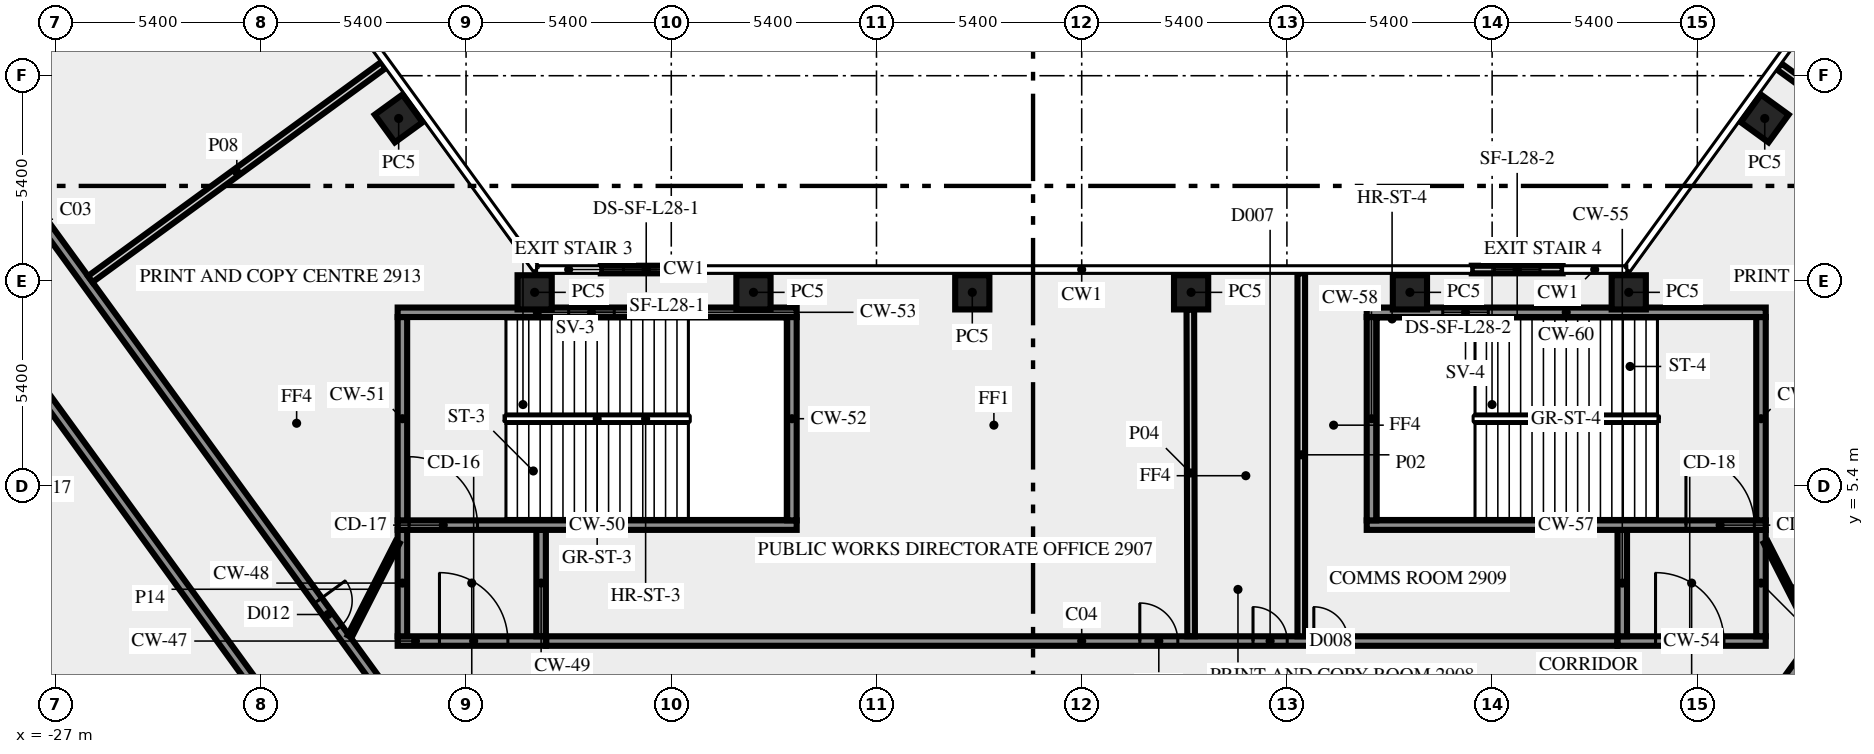
"""IFC4 building model, lengths in metres.
Left out: names, types, materials, properties, quantities, classifications, styles, units other than length and angle.
Written with IfcOpenShell. Run it as: python <this file> out.ifc"""

import sys

from ifc_helpers import new_model, si_unit, direction, frame, frame_2d, origin, origin_2d, place, context, subcontext, project, spatial, rectangle, extrude, element, fill, save


model = new_model("IFC4")
c1 = context("Model", 3, precision=1e-05, world=origin(), true_north=direction((0.0, 1.0)))
c2 = subcontext(c1, "Body", "Model", "MODEL_VIEW")
j1 = project(units=[si_unit("LENGTHUNIT", "METRE"), si_unit("PLANEANGLEUNIT", "RADIAN")], contexts=[c1])
p1 = place(None, origin())
s1 = spatial("IfcSite", under=j1, at=p1, CompositionType="ELEMENT")
p2 = place(p1, origin())
s2 = spatial("IfcBuilding", under=s1, at=p2, CompositionType="ELEMENT")
p3 = place(p2, frame((0.0, 0.0, 125.0)))
s3 = spatial("IfcBuildingStorey", under=s2, at=p3, CompositionType="ELEMENT", Elevation=125.0)
for number, where, z_axis, x_axis in (
    (1, (-17.974, 15.075, 0.0), (0.0, 0.0, 1.0), (-0.588, 0.809, 0.0)),
    (2, (17.974, 15.075, 0.0), (0.0, 0.0, 1.0), (-0.588, -0.809, 0.0)),
    (3, (14.395, 10.5, 0.0), (0.0, 0.0, 1.0), (-1.0, 0.0, 0.0)),
    (4, (8.637, 10.5, 0.0), (0.0, 0.0, 1.0), (-1.0, 0.0, 0.0)),
    (5, (2.879, 10.5, 0.0), (0.0, 0.0, 1.0), (-1.0, 0.0, 0.0)),
    (6, (-2.879, 10.5, 0.0), (0.0, 0.0, 1.0), (-1.0, 0.0, 0.0)),
    (7, (-8.637, 10.5, 0.0), (0.0, 0.0, 1.0), (-1.0, 0.0, 0.0)),
    (8, (-14.395, 10.5, 0.0), (0.0, 0.0, 1.0), (-1.0, 0.0, 0.0)),
):
    element("IfcColumn", number, at=place(p3, frame(where, z_axis=z_axis, x_axis=x_axis)), inside=s3, PredefinedType="COLUMN", context=c2, shape_type="SweptSolid", body=[
        extrude(rectangle(XDim=0.9, YDim=0.9, at=origin_2d()), origin(), (0.0, 0.0, 1.0), 3.65),
    ])
p4 = place(p3, frame((12.655, 11.1, 0.0), z_axis=(0.0, 0.0, 1.0), x_axis=(-1.0, 0.0, 0.0)))
e9 = element("IfcWall", 9, at=p4, inside=s3, PredefinedType="SOLIDWALL", context=c2, shape_type="SweptSolid", body=[
    extrude(rectangle(XDim=2.392, YDim=0.2, at=frame_2d((1.196, 0.0))), origin(), (0.0, 0.0, 1.0), 3.65),
])
p5 = place(p4, frame((0.596, 0.0, 1.0)))
e10 = element("IfcOpeningElement", 10, at=p5, cuts=e9, PredefinedType="OPENING", context=c2, shape_type="SweptSolid", body=[
    extrude(rectangle(XDim=1.2, YDim=1.2, at=frame_2d((0.6, 0.6))), frame((0.0, 0.11, 0.0), z_axis=(0.0, -1.0, 0.0), x_axis=(1.0, 0.0, 0.0)), (0.0, 0.0, 1.0), 0.22),
])
p6 = place(p3, frame((-10.263, 11.1, 0.0), z_axis=(0.0, 0.0, 1.0), x_axis=(-1.0, 0.0, 0.0)))
e11 = element("IfcWall", 11, at=p6, inside=s3, PredefinedType="SOLIDWALL", context=c2, shape_type="SweptSolid", body=[
    extrude(rectangle(XDim=2.392, YDim=0.2, at=frame_2d((1.196, 0.0))), origin(), (0.0, 0.0, 1.0), 3.65),
])
p7 = place(p6, frame((0.596, 0.0, 1.0)))
e12 = element("IfcOpeningElement", 12, at=p7, cuts=e11, PredefinedType="OPENING", context=c2, shape_type="SweptSolid", body=[
    extrude(rectangle(XDim=1.2, YDim=1.2, at=frame_2d((0.6, 0.6))), frame((0.0, 0.11, 0.0), z_axis=(0.0, -1.0, 0.0), x_axis=(1.0, 0.0, 0.0)), (0.0, 0.0, 1.0), 0.22),
])
p8 = place(p3, frame((-18.0, 1.325, 0.0), z_axis=(0.0, 0.0, 1.0), x_axis=(1.0, 0.0, 0.0)))
e13 = element("IfcWall", 13, at=p8, inside=s3, PredefinedType="SHEAR", context=c2, shape_type="SweptSolid", body=[
    extrude(rectangle(XDim=3.9, YDim=0.25, at=frame_2d((1.95, 0.0))), origin(), (0.0, 0.0, 1.0), 3.65),
])
p9 = place(p8, frame((1.1, 0.0, 0.0)))
e14 = element("IfcOpeningElement", 14, at=p9, cuts=e13, PredefinedType="OPENING", context=c2, shape_type="SweptSolid", body=[
    extrude(rectangle(XDim=1.8, YDim=2.1, at=frame_2d((0.9, 1.05))), frame((0.0, 0.135, 0.0), z_axis=(0.0, -1.0, 0.0), x_axis=(1.0, 0.0, 0.0)), (0.0, 0.0, 1.0), 0.27),
])
for number, where, z_axis, x_axis in (
    (15, (-17.875, 1.45, 0.0), (0.0, 0.0, 1.0), (0.0, 1.0, 0.0)),
    (16, (-14.225, 1.45, 0.0), (0.0, 0.0, 1.0), (0.0, 1.0, 0.0)),
):
    element("IfcWall", number, at=place(p3, frame(where, z_axis=z_axis, x_axis=x_axis)), inside=s3, PredefinedType="SHEAR", context=c2, shape_type="SweptSolid", body=[
        extrude(rectangle(XDim=2.8, YDim=0.25, at=frame_2d((1.4, 0.0))), origin(), (0.0, 0.0, 1.0), 3.65),
    ])
p10 = place(p3, frame((-18.0, 4.375, 0.0), z_axis=(0.0, 0.0, 1.0), x_axis=(1.0, 0.0, 0.0)))
e17 = element("IfcWall", 17, at=p10, inside=s3, PredefinedType="SHEAR", context=c2, shape_type="SweptSolid", body=[
    extrude(rectangle(XDim=10.5, YDim=0.25, at=frame_2d((5.25, 0.0))), origin(), (0.0, 0.0, 1.0), 3.65),
])
p11 = place(p10, frame((0.3, 0.0, 0.0)))
e18 = element("IfcOpeningElement", 18, at=p11, cuts=e17, PredefinedType="OPENING", context=c2, shape_type="SweptSolid", body=[
    extrude(rectangle(XDim=1.8, YDim=2.1, at=frame_2d((0.9, 1.05))), frame((0.0, 0.135, 0.0), z_axis=(0.0, -1.0, 0.0), x_axis=(1.0, 0.0, 0.0)), (0.0, 0.0, 1.0), 0.27),
])
for number, where, z_axis, x_axis in (
    (19, (-17.875, 4.5, 0.0), (0.0, 0.0, 1.0), (0.0, 1.0, 0.0)),
    (20, (-7.625, 4.5, 0.0), (0.0, 0.0, 1.0), (0.0, 1.0, 0.0)),
):
    element("IfcWall", number, at=place(p3, frame(where, z_axis=z_axis, x_axis=x_axis)), inside=s3, PredefinedType="SHEAR", context=c2, shape_type="SweptSolid", body=[
        extrude(rectangle(XDim=5.35, YDim=0.25, at=frame_2d((2.675, 0.0))), origin(), (0.0, 0.0, 1.0), 3.65),
    ])
p12 = place(p3, frame((-18.0, 9.975, 0.0), z_axis=(0.0, 0.0, 1.0), x_axis=(1.0, 0.0, 0.0)))
e21 = element("IfcWall", 21, at=p12, inside=s3, PredefinedType="SHEAR", context=c2, shape_type="SweptSolid", body=[
    extrude(rectangle(XDim=10.5, YDim=0.25, at=frame_2d((5.25, 0.0))), origin(), (0.0, 0.0, 1.0), 3.65),
])
p13 = place(p12, frame((4.5, 0.0, 1.0)))
e22 = element("IfcOpeningElement", 22, at=p13, cuts=e21, PredefinedType="OPENING", context=c2, shape_type="SweptSolid", body=[
    extrude(rectangle(XDim=1.2, YDim=1.2, at=frame_2d((0.6, 0.6))), frame((0.0, 0.135, 0.0), z_axis=(0.0, -1.0, 0.0), x_axis=(1.0, 0.0, 0.0)), (0.0, 0.0, 1.0), 0.27),
])
p14 = place(p3, frame((14.1, 1.325, 0.0), z_axis=(0.0, 0.0, 1.0), x_axis=(1.0, 0.0, 0.0)))
e23 = element("IfcWall", 23, at=p14, inside=s3, PredefinedType="SHEAR", context=c2, shape_type="SweptSolid", body=[
    extrude(rectangle(XDim=3.9, YDim=0.25, at=frame_2d((1.95, 0.0))), origin(), (0.0, 0.0, 1.0), 3.65),
])
p15 = place(p14, frame((1.0, 0.0, 0.0)))
e24 = element("IfcOpeningElement", 24, at=p15, cuts=e23, PredefinedType="OPENING", context=c2, shape_type="SweptSolid", body=[
    extrude(rectangle(XDim=1.8, YDim=2.1, at=frame_2d((0.9, 1.05))), frame((0.0, 0.135, 0.0), z_axis=(0.0, -1.0, 0.0), x_axis=(1.0, 0.0, 0.0)), (0.0, 0.0, 1.0), 0.27),
])
for number, where, z_axis, x_axis in (
    (25, (14.225, 1.45, 0.0), (0.0, 0.0, 1.0), (0.0, 1.0, 0.0)),
    (26, (17.875, 1.45, 0.0), (0.0, 0.0, 1.0), (0.0, 1.0, 0.0)),
):
    element("IfcWall", number, at=place(p3, frame(where, z_axis=z_axis, x_axis=x_axis)), inside=s3, PredefinedType="SHEAR", context=c2, shape_type="SweptSolid", body=[
        extrude(rectangle(XDim=2.8, YDim=0.25, at=frame_2d((1.4, 0.0))), origin(), (0.0, 0.0, 1.0), 3.65),
    ])
p16 = place(p3, frame((7.5, 4.375, 0.0), z_axis=(0.0, 0.0, 1.0), x_axis=(1.0, 0.0, 0.0)))
e27 = element("IfcWall", 27, at=p16, inside=s3, PredefinedType="SHEAR", context=c2, shape_type="SweptSolid", body=[
    extrude(rectangle(XDim=10.5, YDim=0.25, at=frame_2d((5.25, 0.0))), origin(), (0.0, 0.0, 1.0), 3.65),
])
p17 = place(p16, frame((8.4, 0.0, 0.0)))
e28 = element("IfcOpeningElement", 28, at=p17, cuts=e27, PredefinedType="OPENING", context=c2, shape_type="SweptSolid", body=[
    extrude(rectangle(XDim=1.8, YDim=2.1, at=frame_2d((0.9, 1.05))), frame((0.0, 0.135, 0.0), z_axis=(0.0, -1.0, 0.0), x_axis=(1.0, 0.0, 0.0)), (0.0, 0.0, 1.0), 0.27),
])
for number, where, z_axis, x_axis in (
    (29, (7.625, 4.5, 0.0), (0.0, 0.0, 1.0), (0.0, 1.0, 0.0)),
    (30, (17.875, 4.5, 0.0), (0.0, 0.0, 1.0), (0.0, 1.0, 0.0)),
):
    element("IfcWall", number, at=place(p3, frame(where, z_axis=z_axis, x_axis=x_axis)), inside=s3, PredefinedType="SHEAR", context=c2, shape_type="SweptSolid", body=[
        extrude(rectangle(XDim=5.35, YDim=0.25, at=frame_2d((2.675, 0.0))), origin(), (0.0, 0.0, 1.0), 3.65),
    ])
p18 = place(p3, frame((7.5, 9.975, 0.0), z_axis=(0.0, 0.0, 1.0), x_axis=(1.0, 0.0, 0.0)))
e31 = element("IfcWall", 31, at=p18, inside=s3, PredefinedType="SHEAR", context=c2, shape_type="SweptSolid", body=[
    extrude(rectangle(XDim=10.5, YDim=0.25, at=frame_2d((5.25, 0.0))), origin(), (0.0, 0.0, 1.0), 3.65),
])
p19 = place(p18, frame((2.0, 0.0, 1.0)))
e32 = element("IfcOpeningElement", 32, at=p19, cuts=e31, PredefinedType="OPENING", context=c2, shape_type="SweptSolid", body=[
    extrude(rectangle(XDim=1.2, YDim=1.2, at=frame_2d((0.6, 0.6))), frame((0.0, 0.135, 0.0), z_axis=(0.0, -1.0, 0.0), x_axis=(1.0, 0.0, 0.0)), (0.0, 0.0, 1.0), 0.27),
])
p20 = place(p3, frame((-20.531, -1.523, 0.0), z_axis=(0.0, 0.0, 1.0), x_axis=(-0.587784522481, 0.809017524614, 0.0)))
e33 = element("IfcWall", 33, at=p20, inside=s3, PredefinedType="SOLIDWALL", context=c2, shape_type="SweptSolid", body=[
    extrude(rectangle(XDim=49.912, YDim=0.25, at=frame_2d((24.956, 0.0))), origin(), (0.0, 0.0, 1.0), 3.65),
])
p21 = place(p20, frame((34.816, 0.0, 0.0)))
e34 = element("IfcOpeningElement", 34, at=p21, cuts=e33, PredefinedType="OPENING", context=c2, shape_type="SweptSolid", body=[
    extrude(rectangle(XDim=0.9, YDim=2.1, at=frame_2d((0.45, 1.05))), frame((0.0, 0.135, 0.0), z_axis=(0.0, -1.0, 0.0), x_axis=(1.0, 0.0, 0.0)), (0.0, 0.0, 1.0), 0.27),
])
p22 = place(p20, frame((33.215, 0.0, 0.0)))
e35 = element("IfcOpeningElement", 35, at=p22, cuts=e33, PredefinedType="OPENING", context=c2, shape_type="SweptSolid", body=[
    extrude(rectangle(XDim=0.9, YDim=2.1, at=frame_2d((0.45, 1.05))), frame((0.0, 0.135, 0.0), z_axis=(0.0, -1.0, 0.0), x_axis=(1.0, 0.0, 0.0)), (0.0, 0.0, 1.0), 0.27),
])
p23 = place(p20, frame((22.916, 0.0, 0.0)))
e36 = element("IfcOpeningElement", 36, at=p23, cuts=e33, PredefinedType="OPENING", context=c2, shape_type="SweptSolid", body=[
    extrude(rectangle(XDim=1.8, YDim=2.1, at=frame_2d((0.9, 1.05))), frame((0.0, 0.135, 0.0), z_axis=(0.0, -1.0, 0.0), x_axis=(1.0, 0.0, 0.0)), (0.0, 0.0, 1.0), 0.27),
])
p24 = place(p20, frame((0.483, 0.0, 0.0)))
e37 = element("IfcOpeningElement", 37, at=p24, cuts=e33, PredefinedType="OPENING", context=c2, shape_type="SweptSolid", body=[
    extrude(rectangle(XDim=1.8, YDim=2.1, at=frame_2d((0.9, 1.05))), frame((0.0, 0.135, 0.0), z_axis=(0.0, -1.0, 0.0), x_axis=(1.0, 0.0, 0.0)), (0.0, 0.0, 1.0), 0.27),
])
p25 = place(p20, frame((25.365, 0.0, 0.0)))
e38 = element("IfcOpeningElement", 38, at=p25, cuts=e33, PredefinedType="OPENING", context=c2, shape_type="SweptSolid", body=[
    extrude(rectangle(XDim=0.9, YDim=2.1, at=frame_2d((0.45, 1.05))), frame((0.0, 0.135, 0.0), z_axis=(0.0, -1.0, 0.0), x_axis=(1.0, 0.0, 0.0)), (0.0, 0.0, 1.0), 0.27),
])
p26 = place(p3, frame((-37.232, 25.972, 0.0), z_axis=(0.0, 0.0, 1.0), x_axis=(0.587786323093, -0.809016216391, 0.0)))
e39 = element("IfcWall", 39, at=p26, inside=s3, PredefinedType="SOLIDWALL", context=c2, shape_type="SweptSolid", body=[
    extrude(rectangle(XDim=33.493, YDim=0.25, at=frame_2d((16.747, 0.0))), origin(), (0.0, 0.0, 1.0), 3.65),
])
p27 = place(p26, frame((9.785, 0.0, 0.0)))
e40 = element("IfcOpeningElement", 40, at=p27, cuts=e39, PredefinedType="OPENING", context=c2, shape_type="SweptSolid", body=[
    extrude(rectangle(XDim=1.8, YDim=2.1, at=frame_2d((0.9, 1.05))), frame((0.0, 0.135, 0.0), z_axis=(0.0, -1.0, 0.0), x_axis=(1.0, 0.0, 0.0)), (0.0, 0.0, 1.0), 0.27),
])
p28 = place(p26, frame((29.152, 0.0, 0.0)))
e41 = element("IfcOpeningElement", 41, at=p28, cuts=e39, PredefinedType="OPENING", context=c2, shape_type="SweptSolid", body=[
    extrude(rectangle(XDim=0.9, YDim=2.1, at=frame_2d((0.45, 1.05))), frame((0.0, 0.135, 0.0), z_axis=(0.0, -1.0, 0.0), x_axis=(1.0, 0.0, 0.0)), (0.0, 0.0, 1.0), 0.27),
])
p29 = place(p26, frame((1.335, 0.0, 0.0)))
e42 = element("IfcOpeningElement", 42, at=p29, cuts=e39, PredefinedType="OPENING", context=c2, shape_type="SweptSolid", body=[
    extrude(rectangle(XDim=0.9, YDim=2.1, at=frame_2d((0.45, 1.05))), frame((0.0, 0.135, 0.0), z_axis=(0.0, -1.0, 0.0), x_axis=(1.0, 0.0, 0.0)), (0.0, 0.0, 1.0), 0.27),
])
p30 = place(p3, frame((-14.09, 1.325, 0.0), z_axis=(0.0, 0.0, 1.0), x_axis=(1.0, 0.0, 0.0)))
e43 = element("IfcWall", 43, at=p30, inside=s3, PredefinedType="SOLIDWALL", context=c2, shape_type="SweptSolid", body=[
    extrude(rectangle(XDim=28.18, YDim=0.25, at=frame_2d((14.09, 0.0))), origin(), (0.0, 0.0, 1.0), 3.65),
])
p31 = place(p30, frame((20.198, 0.0, 0.0)))
e44 = element("IfcOpeningElement", 44, at=p31, cuts=e43, PredefinedType="OPENING", context=c2, shape_type="SweptSolid", body=[
    extrude(rectangle(XDim=0.9, YDim=2.1, at=frame_2d((0.45, 1.05))), frame((0.0, 0.135, 0.0), z_axis=(0.0, -1.0, 0.0), x_axis=(1.0, 0.0, 0.0)), (0.0, 0.0, 1.0), 0.27),
])
p32 = place(p30, frame((15.619, 0.0, 0.0)))
e45 = element("IfcOpeningElement", 45, at=p32, cuts=e43, PredefinedType="OPENING", context=c2, shape_type="SweptSolid", body=[
    extrude(rectangle(XDim=1.0, YDim=2.1, at=frame_2d((0.5, 1.05))), frame((0.0, 0.135, 0.0), z_axis=(0.0, -1.0, 0.0), x_axis=(1.0, 0.0, 0.0)), (0.0, 0.0, 1.0), 0.27),
])
p33 = place(p30, frame((18.598, 0.0, 0.0)))
e46 = element("IfcOpeningElement", 46, at=p33, cuts=e43, PredefinedType="OPENING", context=c2, shape_type="SweptSolid", body=[
    extrude(rectangle(XDim=0.9, YDim=2.1, at=frame_2d((0.45, 1.05))), frame((0.0, 0.135, 0.0), z_axis=(0.0, -1.0, 0.0), x_axis=(1.0, 0.0, 0.0)), (0.0, 0.0, 1.0), 0.27),
])
p34 = place(p3, frame((17.545, -1.125, 0.0), z_axis=(0.0, 0.0, 1.0), x_axis=(0.587786330937, 0.809016210693, 0.0)))
e47 = element("IfcWall", 47, at=p34, inside=s3, PredefinedType="SOLIDWALL", context=c2, shape_type="SweptSolid", body=[
    extrude(rectangle(XDim=30.103, YDim=0.25, at=frame_2d((15.052, 0.0))), origin(), (0.0, 0.0, 1.0), 3.65),
])
p35 = place(p34, frame((3.441, 0.0, 0.0)))
e48 = element("IfcOpeningElement", 48, at=p35, cuts=e47, PredefinedType="OPENING", context=c2, shape_type="SweptSolid", body=[
    extrude(rectangle(XDim=0.9, YDim=2.1, at=frame_2d((0.45, 1.05))), frame((0.0, 0.135, 0.0), z_axis=(0.0, -1.0, 0.0), x_axis=(1.0, 0.0, 0.0)), (0.0, 0.0, 1.0), 0.27),
])
p36 = place(p34, frame((28.729, 0.0, 0.0)))
e49 = element("IfcOpeningElement", 49, at=p36, cuts=e47, PredefinedType="OPENING", context=c2, shape_type="SweptSolid", body=[
    extrude(rectangle(XDim=0.9, YDim=2.1, at=frame_2d((0.45, 1.05))), frame((0.0, 0.135, 0.0), z_axis=(0.0, -1.0, 0.0), x_axis=(1.0, 0.0, 0.0)), (0.0, 0.0, 1.0), 0.27),
])
p37 = place(p3, frame((5.778, 11.0, 0.0), z_axis=(0.0, 0.0, 1.0), x_axis=(0.0, -1.0, 0.0)))
e50 = element("IfcWall", 50, at=p37, inside=s3, PredefinedType="SOLIDWALL", context=c2, shape_type="SweptSolid", body=[
    extrude(rectangle(XDim=9.55, YDim=0.2, at=frame_2d((4.775, 0.0))), origin(), (0.0, 0.0, 1.0), 2.75),
])
p38 = place(p3, frame((2.879, 1.45, 0.0), z_axis=(0.0, 0.0, 1.0), x_axis=(-0.002357613104, 0.999997220826, 0.0)))
e51 = element("IfcWall", 51, at=p38, inside=s3, PredefinedType="SOLIDWALL", context=c2, shape_type="SweptSolid", body=[
    extrude(rectangle(XDim=8.595, YDim=0.2, at=frame_2d((4.297, 0.0))), origin(), (0.0, 0.0, 1.0), 3.65),
])
p39 = place(p3, frame((-26.089, 10.848, 0.0), z_axis=(0.0, 0.0, 1.0), x_axis=(0.807661302092, 0.589646691759, 0.0)))
e52 = element("IfcWall", 52, at=p39, inside=s3, PredefinedType="SOLIDWALL", context=c2, shape_type="SweptSolid", body=[
    extrude(rectangle(XDim=9.55, YDim=0.2, at=frame_2d((4.775, 0.0))), origin(), (0.0, 0.0, 1.0), 2.75),
])
p40 = place(p3, frame((26.077, 10.832, 0.0), z_axis=(0.0, 0.0, 1.0), x_axis=(-0.809052142986, 0.587736871338, 0.0)))
e53 = element("IfcWall", 53, at=p40, inside=s3, PredefinedType="SOLIDWALL", context=c2, shape_type="SweptSolid", body=[
    extrude(rectangle(XDim=9.55, YDim=0.2, at=frame_2d((4.775, 0.0))), origin(), (0.0, 0.0, 1.0), 2.75),
])
for number, where, z_axis, x_axis in (
    (54, (18.0, 3.925, 0.0), (0.0, 0.0, 1.0), (0.454, -0.891, 0.0)),
    (55, (-19.261, 1.45, 0.0), (0.0, 0.0, 1.0), (0.454, 0.891, 0.0)),
):
    element("IfcWall", number, at=place(p3, frame(where, z_axis=z_axis, x_axis=x_axis)), inside=s3, PredefinedType="PARTITIONING", context=c2, shape_type="SweptSolid", body=[
        extrude(rectangle(XDim=2.778, YDim=0.12, at=frame_2d((1.389, 0.0))), origin(), (0.0, 0.0, 1.0), 3.65),
    ])
p41 = place(p5, origin())
e56 = element("IfcWindow", 56, at=p41, inside=s3, PartitioningType="SINGLE_PANEL", PredefinedType="WINDOW", context=c2, shape_type="SweptSolid", body=[
    extrude(rectangle(XDim=1.2, YDim=1.2, at=frame_2d((0.6, 0.6))), frame((0.0, 0.03, 0.0), z_axis=(0.0, -1.0, 0.0), x_axis=(1.0, 0.0, 0.0)), (0.0, 0.0, 1.0), 0.06),
])
fill(e10, e56)
p42 = place(p7, origin())
e57 = element("IfcWindow", 57, at=p42, inside=s3, PartitioningType="SINGLE_PANEL", PredefinedType="WINDOW", context=c2, shape_type="SweptSolid", body=[
    extrude(rectangle(XDim=1.2, YDim=1.2, at=frame_2d((0.6, 0.6))), frame((0.0, 0.03, 0.0), z_axis=(0.0, -1.0, 0.0), x_axis=(1.0, 0.0, 0.0)), (0.0, 0.0, 1.0), 0.06),
])
fill(e12, e57)
p43 = place(p9, origin())
e58 = element("IfcDoor", 58, at=p43, inside=s3, OperationType="DOUBLE_DOOR_SINGLE_SWING", PredefinedType="DOOR", context=c2, shape_type="SweptSolid", body=[
    extrude(rectangle(XDim=1.8, YDim=2.1, at=frame_2d((0.9, 1.05))), frame((0.0, 0.025, 0.0), z_axis=(0.0, -1.0, 0.0), x_axis=(1.0, 0.0, 0.0)), (0.0, 0.0, 1.0), 0.05),
])
fill(e14, e58)
p44 = place(p11, origin())
e59 = element("IfcDoor", 59, at=p44, inside=s3, OperationType="DOUBLE_DOOR_SINGLE_SWING", PredefinedType="DOOR", context=c2, shape_type="SweptSolid", body=[
    extrude(rectangle(XDim=1.8, YDim=2.1, at=frame_2d((0.9, 1.05))), frame((0.0, 0.025, 0.0), z_axis=(0.0, -1.0, 0.0), x_axis=(1.0, 0.0, 0.0)), (0.0, 0.0, 1.0), 0.05),
])
fill(e18, e59)
p45 = place(p13, origin())
e60 = element("IfcWindow", 60, at=p45, inside=s3, PartitioningType="SINGLE_PANEL", PredefinedType="WINDOW", context=c2, shape_type="SweptSolid", body=[
    extrude(rectangle(XDim=1.2, YDim=1.2, at=frame_2d((0.6, 0.6))), frame((0.0, 0.03, 0.0), z_axis=(0.0, -1.0, 0.0), x_axis=(1.0, 0.0, 0.0)), (0.0, 0.0, 1.0), 0.06),
])
fill(e22, e60)
p46 = place(p15, origin())
e61 = element("IfcDoor", 61, at=p46, inside=s3, OperationType="DOUBLE_DOOR_SINGLE_SWING", PredefinedType="DOOR", context=c2, shape_type="SweptSolid", body=[
    extrude(rectangle(XDim=1.8, YDim=2.1, at=frame_2d((0.9, 1.05))), frame((0.0, 0.025, 0.0), z_axis=(0.0, -1.0, 0.0), x_axis=(1.0, 0.0, 0.0)), (0.0, 0.0, 1.0), 0.05),
])
fill(e24, e61)
p47 = place(p17, origin())
e62 = element("IfcDoor", 62, at=p47, inside=s3, OperationType="DOUBLE_DOOR_SINGLE_SWING", PredefinedType="DOOR", context=c2, shape_type="SweptSolid", body=[
    extrude(rectangle(XDim=1.8, YDim=2.1, at=frame_2d((0.9, 1.05))), frame((0.0, 0.025, 0.0), z_axis=(0.0, -1.0, 0.0), x_axis=(1.0, 0.0, 0.0)), (0.0, 0.0, 1.0), 0.05),
])
fill(e28, e62)
p48 = place(p19, origin())
e63 = element("IfcWindow", 63, at=p48, inside=s3, PartitioningType="SINGLE_PANEL", PredefinedType="WINDOW", context=c2, shape_type="SweptSolid", body=[
    extrude(rectangle(XDim=1.2, YDim=1.2, at=frame_2d((0.6, 0.6))), frame((0.0, 0.03, 0.0), z_axis=(0.0, -1.0, 0.0), x_axis=(1.0, 0.0, 0.0)), (0.0, 0.0, 1.0), 0.06),
])
fill(e32, e63)
p49 = place(p31, origin())
e64 = element("IfcDoor", 64, at=p49, inside=s3, OperationType="SINGLE_SWING_LEFT", PredefinedType="DOOR", context=c2, shape_type="SweptSolid", body=[
    extrude(rectangle(XDim=0.9, YDim=2.1, at=frame_2d((0.45, 1.05))), frame((0.0, 0.025, 0.0), z_axis=(0.0, -1.0, 0.0), x_axis=(1.0, 0.0, 0.0)), (0.0, 0.0, 1.0), 0.05),
])
fill(e44, e64)
p50 = place(p32, origin())
e65 = element("IfcDoor", 65, at=p50, inside=s3, OperationType="SINGLE_SWING_RIGHT", PredefinedType="DOOR", context=c2, shape_type="SweptSolid", body=[
    extrude(rectangle(XDim=1.0, YDim=2.1, at=frame_2d((0.5, 1.05))), frame((0.0, 0.025, 0.0), z_axis=(0.0, -1.0, 0.0), x_axis=(1.0, 0.0, 0.0)), (0.0, 0.0, 1.0), 0.05),
])
fill(e45, e65)
p51 = place(p33, origin())
e66 = element("IfcDoor", 66, at=p51, inside=s3, OperationType="SINGLE_SWING_RIGHT", PredefinedType="DOOR", context=c2, shape_type="SweptSolid", body=[
    extrude(rectangle(XDim=0.9, YDim=2.1, at=frame_2d((0.45, 1.05))), frame((0.0, 0.025, 0.0), z_axis=(0.0, -1.0, 0.0), x_axis=(1.0, 0.0, 0.0)), (0.0, 0.0, 1.0), 0.05),
])
fill(e46, e66)
p52 = place(p28, origin())
e67 = element("IfcDoor", 67, at=p52, inside=s3, OperationType="SINGLE_SWING_RIGHT", PredefinedType="DOOR", context=c2, shape_type="SweptSolid", body=[
    extrude(rectangle(XDim=0.9, YDim=2.1, at=frame_2d((0.45, 1.05))), frame((0.0, 0.025, 0.0), z_axis=(0.0, -1.0, 0.0), x_axis=(1.0, 0.0, 0.0)), (0.0, 0.0, 1.0), 0.05),
])
fill(e41, e67)
save(model, sys.argv[1])
